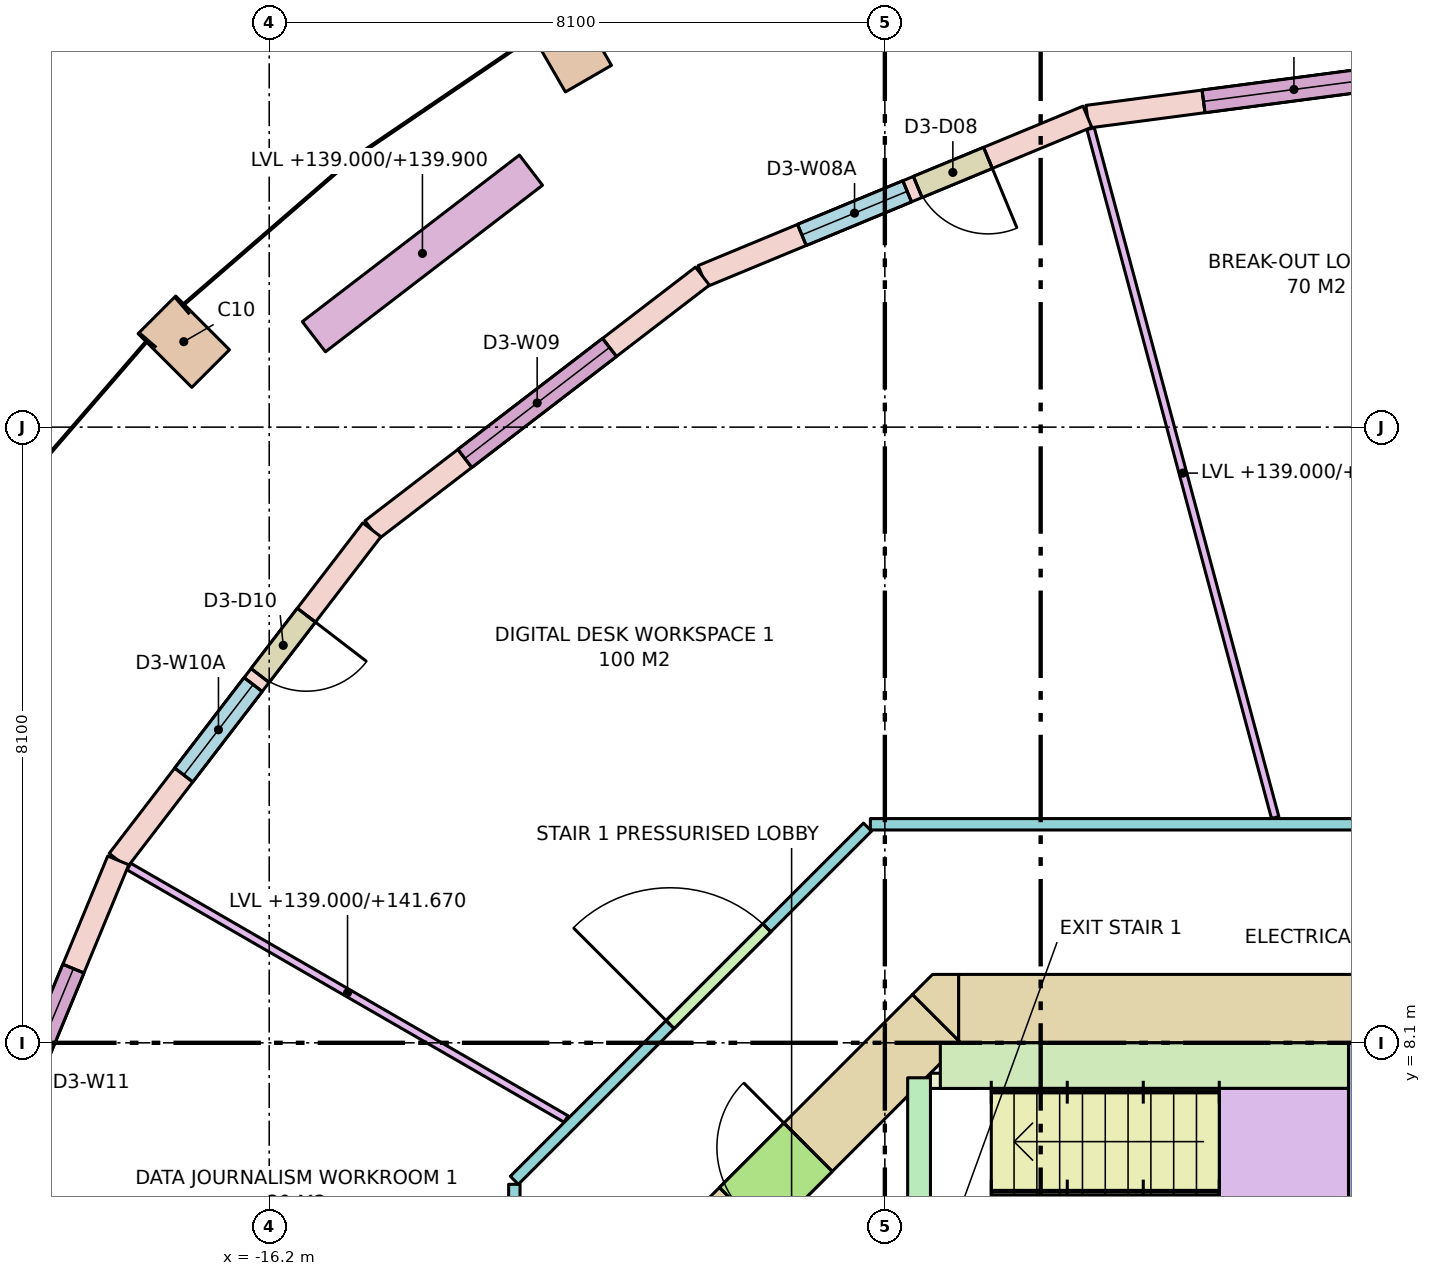
"""IFC4 building model, lengths in metres.
Left out: names, types, materials, properties, quantities, classifications, styles, units other than length and angle.
Written with IfcOpenShell. Run it as: python <this file> out.ifc"""

import sys

from ifc_helpers import new_model, si_unit, direction, frame, frame_2d, origin, origin_2d, place, context, subcontext, project, spatial, polyline, rectangle, outline, extrude, element, fill, save


model = new_model("IFC4")
c1 = context("Model", 3, precision=1e-05, world=origin(), true_north=direction((0.0, 1.0)))
c2 = subcontext(c1, "Body", "Model", "MODEL_VIEW")
j1 = project(units=[si_unit("LENGTHUNIT", "METRE"), si_unit("PLANEANGLEUNIT", "RADIAN")], contexts=[c1])
p1 = place(None, origin())
s1 = spatial("IfcSite", under=j1, at=p1, CompositionType="ELEMENT")
p2 = place(p1, origin())
s2 = spatial("IfcBuilding", under=s1, at=p2, CompositionType="ELEMENT")
p3 = place(p2, frame((0.0, 0.0, 139.0)))
s3 = spatial("IfcBuildingStorey", under=s2, at=p3, CompositionType="ELEMENT", Elevation=139.0)
for number, where, z_axis, x_axis in (
    (1, (-12.25, 21.218, 0.0), (0.0, 0.0, 1.0), (-0.866, -0.5, 0.0)),
    (2, (-17.324, 17.324, 0.0), (0.0, 0.0, 1.0), (-0.707, -0.707, 0.0)),
):
    element("IfcColumn", number, at=place(p3, frame(where, z_axis=z_axis, x_axis=x_axis)), inside=s3, PredefinedType="COLUMN", context=c2, shape_type="SweptSolid", body=[
        extrude(rectangle(XDim=0.7, YDim=1.0, at=origin_2d()), origin(), (0.0, 0.0, 1.0), 3.8),
    ])
p4 = place(p3, frame((-7.13, 8.55, -0.28), z_axis=(0.0, 0.0, 1.0), x_axis=(1.0, 0.0, 0.0)))
e3 = element("IfcWall", 3, at=p4, inside=s3, PredefinedType="SHEAR", context=c2, shape_type="SweptSolid", body=[
    extrude(rectangle(XDim=14.26, YDim=0.9, at=frame_2d((7.13, 0.0))), origin(), (0.0, 0.0, 1.0), 3.8),
])
p5 = place(p4, frame((5.48, 0.0, 0.28)))
e4 = element("IfcOpeningElement", 4, at=p5, cuts=e3, PredefinedType="OPENING", context=c2, shape_type="SweptSolid", body=[
    extrude(rectangle(XDim=0.7, YDim=2.1, at=frame_2d((0.35, 1.05))), frame((0.0, 0.46, 0.0), z_axis=(0.0, -1.0, 0.0), x_axis=(1.0, 0.0, 0.0)), (0.0, 0.0, 1.0), 0.92),
])
p6 = place(p4, frame((7.155, 0.0, 0.28)))
e5 = element("IfcOpeningElement", 5, at=p6, cuts=e3, PredefinedType="OPENING", context=c2, shape_type="SweptSolid", body=[
    extrude(rectangle(XDim=0.9, YDim=2.1, at=frame_2d((0.45, 1.05))), frame((0.0, 0.46, 0.0), z_axis=(0.0, -1.0, 0.0), x_axis=(1.0, 0.0, 0.0)), (0.0, 0.0, 1.0), 0.92),
])
p7 = place(p3, frame((-10.418, 5.418, -0.28), z_axis=(0.0, 0.0, 1.0), x_axis=(0.707106781187, 0.707106781187, 0.0)))
e6 = element("IfcWall", 6, at=p7, inside=s3, PredefinedType="SHEAR", context=c2, shape_type="SweptSolid", body=[
    extrude(rectangle(XDim=4.243, YDim=0.9, at=frame_2d((2.121, 0.0))), origin(), (0.0, 0.0, 1.0), 3.8),
])
p8 = place(p7, frame((0.65, 0.0, 0.28)))
e7 = element("IfcOpeningElement", 7, at=p8, cuts=e6, PredefinedType="OPENING", context=c2, shape_type="SweptSolid", body=[
    extrude(rectangle(XDim=1.2, YDim=2.1, at=frame_2d((0.6, 1.05))), frame((0.0, 0.46, 0.0), z_axis=(0.0, -1.0, 0.0), x_axis=(1.0, 0.0, 0.0)), (0.0, 0.0, 1.0), 0.92),
])
p9 = place(p3, frame((0.0, 0.0, -0.28)))
e8 = element("IfcWall", 8, at=p9, inside=s3, PredefinedType="SHEAR", context=c2, shape_type="SweptSolid", body=[
    extrude(outline(polyline([(-7.473, 9.0), (-7.13, 9.0), (-7.13, 8.13), (-7.736, 8.736), (-7.473, 9.0)])), origin(), (0.0, 0.0, 1.0), 3.8),
])
p10 = place(p3, frame((-1.85, 1.5, 0.0), z_axis=(0.0, 0.0, 1.0), x_axis=(0.0, 1.0, 0.0)))
e9 = element("IfcWall", 9, at=p10, inside=s3, PredefinedType="SHEAR", context=c2, shape_type="SweptSolid", body=[
    extrude(rectangle(XDim=6.6, YDim=0.3, at=frame_2d((3.3, 0.0))), origin(), (0.0, 0.0, 1.0), 3.52),
])
p11 = place(p3, frame((-7.65, 4.5, 0.0), z_axis=(0.0, 0.0, 1.0), x_axis=(0.0, 1.0, 0.0)))
e10 = element("IfcWall", 10, at=p11, inside=s3, PredefinedType="SHEAR", context=c2, shape_type="SweptSolid", body=[
    extrude(rectangle(XDim=3.14, YDim=0.3, at=frame_2d((1.57, 0.0))), origin(), (0.0, 0.0, 1.0), 3.52),
])
p12 = place(p11, frame((0.14, 0.0, 0.0)))
e11 = element("IfcOpeningElement", 11, at=p12, cuts=e10, PredefinedType="OPENING", context=c2, shape_type="SweptSolid", body=[
    extrude(rectangle(XDim=1.32, YDim=2.1, at=frame_2d((0.66, 1.05))), frame((0.0, 0.16, 0.0), z_axis=(0.0, -1.0, 0.0), x_axis=(1.0, 0.0, 0.0)), (0.0, 0.0, 1.0), 0.32),
])
p13 = place(p3, frame((-7.37, 7.8, 0.0), z_axis=(0.0, 0.0, 1.0), x_axis=(1.0, 0.0, 0.0)))
e12 = element("IfcWall", 12, at=p13, inside=s3, PredefinedType="SHEAR", context=c2, shape_type="SweptSolid", body=[
    extrude(rectangle(XDim=5.37, YDim=0.6, at=frame_2d((2.685, 0.0))), origin(), (0.0, 0.0, 1.0), 3.52),
])
p14 = place(p3, frame((-7.5, 7.6, 0.0), z_axis=(0.0, 0.0, 1.0), x_axis=(1.0, 0.0, 0.0)))
e13 = element("IfcWall", 13, at=p14, inside=s3, PredefinedType="SHEAR", context=c2, shape_type="SweptSolid", body=[
    extrude(rectangle(XDim=0.6, YDim=0.2, at=frame_2d((0.3, 0.0))), origin(), (0.0, 0.0, 1.0), 3.52),
])
p15 = place(p3, frame((0.0, 21.0, 0.0), z_axis=(0.0, 0.0, 1.0), x_axis=(-0.991444743541, -0.130527087244, 0.0)))
e14 = element("IfcWall", 14, at=p15, inside=s3, PredefinedType="STANDARD", context=c2, shape_type="SweptSolid", body=[
    extrude(rectangle(XDim=5.482, YDim=0.3, at=frame_2d((2.741, 0.0))), origin(), (0.0, 0.0, 1.0), 3.52),
])
p16 = place(p15, frame((1.541, 0.0, 0.8)))
e15 = element("IfcOpeningElement", 15, at=p16, cuts=e14, PredefinedType="OPENING", context=c2, shape_type="SweptSolid", body=[
    extrude(rectangle(XDim=2.4, YDim=2.5, at=frame_2d((1.2, 1.25))), frame((0.0, 0.16, 0.0), z_axis=(0.0, -1.0, 0.0), x_axis=(1.0, 0.0, 0.0)), (0.0, 0.0, 1.0), 0.32),
])
p17 = place(p3, frame((-5.435, 20.284, 0.0), z_axis=(0.0, 0.0, 1.0), x_axis=(-0.923877333662, -0.382688740813, 0.0)))
e16 = element("IfcWall", 16, at=p17, inside=s3, PredefinedType="STANDARD", context=c2, shape_type="SweptSolid", body=[
    extrude(rectangle(XDim=5.482, YDim=0.3, at=frame_2d((2.741, 0.0))), origin(), (0.0, 0.0, 1.0), 3.52),
])
p18 = place(p17, frame((1.416, 0.0, 0.0)))
e17 = element("IfcOpeningElement", 17, at=p18, cuts=e16, PredefinedType="OPENING", context=c2, shape_type="SweptSolid", body=[
    extrude(rectangle(XDim=1.0, YDim=2.4, at=frame_2d((0.5, 1.2))), frame((0.0, 0.16, 0.0), z_axis=(0.0, -1.0, 0.0), x_axis=(1.0, 0.0, 0.0)), (0.0, 0.0, 1.0), 0.32),
])
p19 = place(p17, frame((2.566, 0.0, 0.8)))
e18 = element("IfcOpeningElement", 18, at=p19, cuts=e16, PredefinedType="OPENING", context=c2, shape_type="SweptSolid", body=[
    extrude(rectangle(XDim=1.5, YDim=2.5, at=frame_2d((0.75, 1.25))), frame((0.0, 0.16, 0.0), z_axis=(0.0, -1.0, 0.0), x_axis=(1.0, 0.0, 0.0)), (0.0, 0.0, 1.0), 0.32),
])
p20 = place(p3, frame((-10.5, 18.187, 0.0), z_axis=(0.0, 0.0, 1.0), x_axis=(-0.793335336593, -0.608784891166, 0.0)))
e19 = element("IfcWall", 19, at=p20, inside=s3, PredefinedType="STANDARD", context=c2, shape_type="SweptSolid", body=[
    extrude(rectangle(XDim=5.482, YDim=0.3, at=frame_2d((2.741, 0.0))), origin(), (0.0, 0.0, 1.0), 3.52),
])
p21 = place(p20, frame((1.541, 0.0, 0.8)))
e20 = element("IfcOpeningElement", 20, at=p21, cuts=e19, PredefinedType="OPENING", context=c2, shape_type="SweptSolid", body=[
    extrude(rectangle(XDim=2.4, YDim=2.5, at=frame_2d((1.2, 1.25))), frame((0.0, 0.16, 0.0), z_axis=(0.0, -1.0, 0.0), x_axis=(1.0, 0.0, 0.0)), (0.0, 0.0, 1.0), 0.32),
])
p22 = place(p3, frame((-14.849, 14.849, 0.0), z_axis=(0.0, 0.0, 1.0), x_axis=(-0.608784891166, -0.793335336593, 0.0)))
e21 = element("IfcWall", 21, at=p22, inside=s3, PredefinedType="STANDARD", context=c2, shape_type="SweptSolid", body=[
    extrude(rectangle(XDim=5.482, YDim=0.3, at=frame_2d((2.741, 0.0))), origin(), (0.0, 0.0, 1.0), 3.52),
])
p23 = place(p22, frame((1.416, 0.0, 0.0)))
e22 = element("IfcOpeningElement", 22, at=p23, cuts=e21, PredefinedType="OPENING", context=c2, shape_type="SweptSolid", body=[
    extrude(rectangle(XDim=1.0, YDim=2.4, at=frame_2d((0.5, 1.2))), frame((0.0, 0.16, 0.0), z_axis=(0.0, -1.0, 0.0), x_axis=(1.0, 0.0, 0.0)), (0.0, 0.0, 1.0), 0.32),
])
p24 = place(p22, frame((2.566, 0.0, 0.8)))
e23 = element("IfcOpeningElement", 23, at=p24, cuts=e21, PredefinedType="OPENING", context=c2, shape_type="SweptSolid", body=[
    extrude(rectangle(XDim=1.5, YDim=2.5, at=frame_2d((0.75, 1.25))), frame((0.0, 0.16, 0.0), z_axis=(0.0, -1.0, 0.0), x_axis=(1.0, 0.0, 0.0)), (0.0, 0.0, 1.0), 0.32),
])
p25 = place(p3, frame((-18.187, 10.5, 0.0), z_axis=(0.0, 0.0, 1.0), x_axis=(-0.382688740813, -0.923877333662, 0.0)))
e24 = element("IfcWall", 24, at=p25, inside=s3, PredefinedType="STANDARD", context=c2, shape_type="SweptSolid", body=[
    extrude(rectangle(XDim=5.482, YDim=0.3, at=frame_2d((2.741, 0.0))), origin(), (0.0, 0.0, 1.0), 3.52),
])
p26 = place(p25, frame((1.541, 0.0, 0.8)))
e25 = element("IfcOpeningElement", 25, at=p26, cuts=e24, PredefinedType="OPENING", context=c2, shape_type="SweptSolid", body=[
    extrude(rectangle(XDim=2.4, YDim=2.5, at=frame_2d((1.2, 1.25))), frame((0.0, 0.16, 0.0), z_axis=(0.0, -1.0, 0.0), x_axis=(1.0, 0.0, 0.0)), (0.0, 0.0, 1.0), 0.32),
])
p27 = place(p3, frame((-12.756, 19.581, 0.0), z_axis=(0.0, 0.0, 1.0), x_axis=(-0.793384730612, -0.608720518162, 0.0)))
e26 = element("IfcWall", 26, at=p27, inside=s3, PredefinedType="PARAPET", context=c2, shape_type="SweptSolid", body=[
    extrude(rectangle(XDim=3.6, YDim=0.5, at=frame_2d((1.8, 0.0))), origin(), (0.0, 0.0, 1.0), 0.9),
])
p28 = place(p3, frame((-12.975, 1.275, 0.0), z_axis=(0.0, 0.0, 1.0), x_axis=(0.0, 1.0, 0.0)))
e27 = element("IfcWall", 27, at=p28, inside=s3, PredefinedType="PARTITIONING", context=c2, shape_type="SweptSolid", body=[
    extrude(rectangle(XDim=4.963, YDim=0.15, at=frame_2d((2.482, 0.0))), origin(), (0.0, 0.0, 1.0), 2.67),
])
p29 = place(p28, frame((3.107, 0.0, 0.0)))
e28 = element("IfcOpeningElement", 28, at=p29, cuts=e27, PredefinedType="OPENING", context=c2, shape_type="SweptSolid", body=[
    extrude(rectangle(XDim=0.9, YDim=2.1, at=frame_2d((0.45, 1.05))), frame((0.0, 0.085, 0.0), z_axis=(0.0, -1.0, 0.0), x_axis=(1.0, 0.0, 0.0)), (0.0, 0.0, 1.0), 0.17),
])
p30 = place(p3, frame((-12.975, 6.291, 0.0), z_axis=(0.0, 0.0, 1.0), x_axis=(0.707125355289, 0.707088206597, 0.0)))
e29 = element("IfcWall", 29, at=p30, inside=s3, PredefinedType="PARTITIONING", context=c2, shape_type="SweptSolid", body=[
    extrude(rectangle(XDim=6.572, YDim=0.15, at=frame_2d((3.286, 0.0))), origin(), (0.0, 0.0, 1.0), 2.67),
])
p31 = place(p30, frame((2.898, 0.0, 0.0)))
e30 = element("IfcOpeningElement", 30, at=p31, cuts=e29, PredefinedType="OPENING", context=c2, shape_type="SweptSolid", body=[
    extrude(rectangle(XDim=1.8, YDim=2.1, at=frame_2d((0.9, 1.05))), frame((0.0, 0.085, 0.0), z_axis=(0.0, -1.0, 0.0), x_axis=(1.0, 0.0, 0.0)), (0.0, 0.0, 1.0), 0.17),
])
p32 = place(p3, frame((-8.291, 10.975, 0.0), z_axis=(0.0, 0.0, 1.0), x_axis=(1.0, 0.0, 0.0)))
e31 = element("IfcWall", 31, at=p32, inside=s3, PredefinedType="PARTITIONING", context=c2, shape_type="SweptSolid", body=[
    extrude(rectangle(XDim=9.99, YDim=0.15, at=frame_2d((4.995, 0.0))), origin(), (0.0, 0.0, 1.0), 2.67),
])
p33 = place(p3, frame((-2.965, 11.064, 0.0), z_axis=(0.0, 0.0, 1.0), x_axis=(-0.258812392192, 0.965927608906, 0.0)))
e32 = element("IfcWall", 32, at=p33, inside=s3, PredefinedType="PARTITIONING", context=c2, shape_type="SweptSolid", body=[
    extrude(rectangle(XDim=9.382, YDim=0.1, at=frame_2d((4.691, 0.0))), origin(), (0.0, 0.0, 1.0), 2.67),
])
p34 = place(p3, frame((-12.294, 7.098, 0.0), z_axis=(0.0, 0.0, 1.0), x_axis=(-0.866010486135, 0.500025837236, 0.0)))
e33 = element("IfcWall", 33, at=p34, inside=s3, PredefinedType="PARTITIONING", context=c2, shape_type="SweptSolid", body=[
    extrude(rectangle(XDim=6.641, YDim=0.1, at=frame_2d((3.32, 0.0))), origin(), (0.0, 0.0, 1.0), 2.67),
])
p35 = place(p16, origin())
e34 = element("IfcWindow", 34, at=p35, inside=s3, PartitioningType="SINGLE_PANEL", PredefinedType="WINDOW", context=c2, shape_type="SweptSolid", body=[
    extrude(rectangle(XDim=2.4, YDim=2.5, at=frame_2d((1.2, 1.25))), frame((0.0, 0.03, 0.0), z_axis=(0.0, -1.0, 0.0), x_axis=(1.0, 0.0, 0.0)), (0.0, 0.0, 1.0), 0.06),
])
fill(e15, e34)
p36 = place(p18, origin())
e35 = element("IfcDoor", 35, at=p36, inside=s3, OperationType="SINGLE_SWING_LEFT", PredefinedType="DOOR", context=c2, shape_type="SweptSolid", body=[
    extrude(rectangle(XDim=1.0, YDim=2.4, at=frame_2d((0.5, 1.2))), frame((0.0, 0.025, 0.0), z_axis=(0.0, -1.0, 0.0), x_axis=(1.0, 0.0, 0.0)), (0.0, 0.0, 1.0), 0.05),
])
fill(e17, e35)
p37 = place(p19, origin())
e36 = element("IfcWindow", 36, at=p37, inside=s3, PartitioningType="SINGLE_PANEL", PredefinedType="WINDOW", context=c2, shape_type="SweptSolid", body=[
    extrude(rectangle(XDim=1.5, YDim=2.5, at=frame_2d((0.75, 1.25))), frame((0.0, 0.03, 0.0), z_axis=(0.0, -1.0, 0.0), x_axis=(1.0, 0.0, 0.0)), (0.0, 0.0, 1.0), 0.06),
])
fill(e18, e36)
p38 = place(p21, origin())
e37 = element("IfcWindow", 37, at=p38, inside=s3, PartitioningType="SINGLE_PANEL", PredefinedType="WINDOW", context=c2, shape_type="SweptSolid", body=[
    extrude(rectangle(XDim=2.4, YDim=2.5, at=frame_2d((1.2, 1.25))), frame((0.0, 0.03, 0.0), z_axis=(0.0, -1.0, 0.0), x_axis=(1.0, 0.0, 0.0)), (0.0, 0.0, 1.0), 0.06),
])
fill(e20, e37)
p39 = place(p23, origin())
e38 = element("IfcDoor", 38, at=p39, inside=s3, OperationType="SINGLE_SWING_LEFT", PredefinedType="DOOR", context=c2, shape_type="SweptSolid", body=[
    extrude(rectangle(XDim=1.0, YDim=2.4, at=frame_2d((0.5, 1.2))), frame((0.0, 0.025, 0.0), z_axis=(0.0, -1.0, 0.0), x_axis=(1.0, 0.0, 0.0)), (0.0, 0.0, 1.0), 0.05),
])
fill(e22, e38)
p40 = place(p24, origin())
e39 = element("IfcWindow", 39, at=p40, inside=s3, PartitioningType="SINGLE_PANEL", PredefinedType="WINDOW", context=c2, shape_type="SweptSolid", body=[
    extrude(rectangle(XDim=1.5, YDim=2.5, at=frame_2d((0.75, 1.25))), frame((0.0, 0.03, 0.0), z_axis=(0.0, -1.0, 0.0), x_axis=(1.0, 0.0, 0.0)), (0.0, 0.0, 1.0), 0.06),
])
fill(e23, e39)
p41 = place(p26, origin())
e40 = element("IfcWindow", 40, at=p41, inside=s3, PartitioningType="SINGLE_PANEL", PredefinedType="WINDOW", context=c2, shape_type="SweptSolid", body=[
    extrude(rectangle(XDim=2.4, YDim=2.5, at=frame_2d((1.2, 1.25))), frame((0.0, 0.03, 0.0), z_axis=(0.0, -1.0, 0.0), x_axis=(1.0, 0.0, 0.0)), (0.0, 0.0, 1.0), 0.06),
])
fill(e25, e40)
p42 = place(p8, origin())
e41 = element("IfcDoor", 41, at=p42, inside=s3, OperationType="SINGLE_SWING_RIGHT", PredefinedType="DOOR", context=c2, shape_type="SweptSolid", body=[
    extrude(rectangle(XDim=1.2, YDim=2.1, at=frame_2d((0.6, 1.05))), frame((0.0, 0.025, 0.0), z_axis=(0.0, -1.0, 0.0), x_axis=(1.0, 0.0, 0.0)), (0.0, 0.0, 1.0), 0.05),
])
fill(e7, e41)
p43 = place(p31, origin())
e42 = element("IfcDoor", 42, at=p43, inside=s3, OperationType="DOUBLE_DOOR_SINGLE_SWING", PredefinedType="DOOR", context=c2, shape_type="SweptSolid", body=[
    extrude(rectangle(XDim=1.8, YDim=2.1, at=frame_2d((0.9, 1.05))), frame((0.0, 0.025, 0.0), z_axis=(0.0, -1.0, 0.0), x_axis=(1.0, 0.0, 0.0)), (0.0, 0.0, 1.0), 0.05),
])
fill(e30, e42)
save(model, sys.argv[1])
